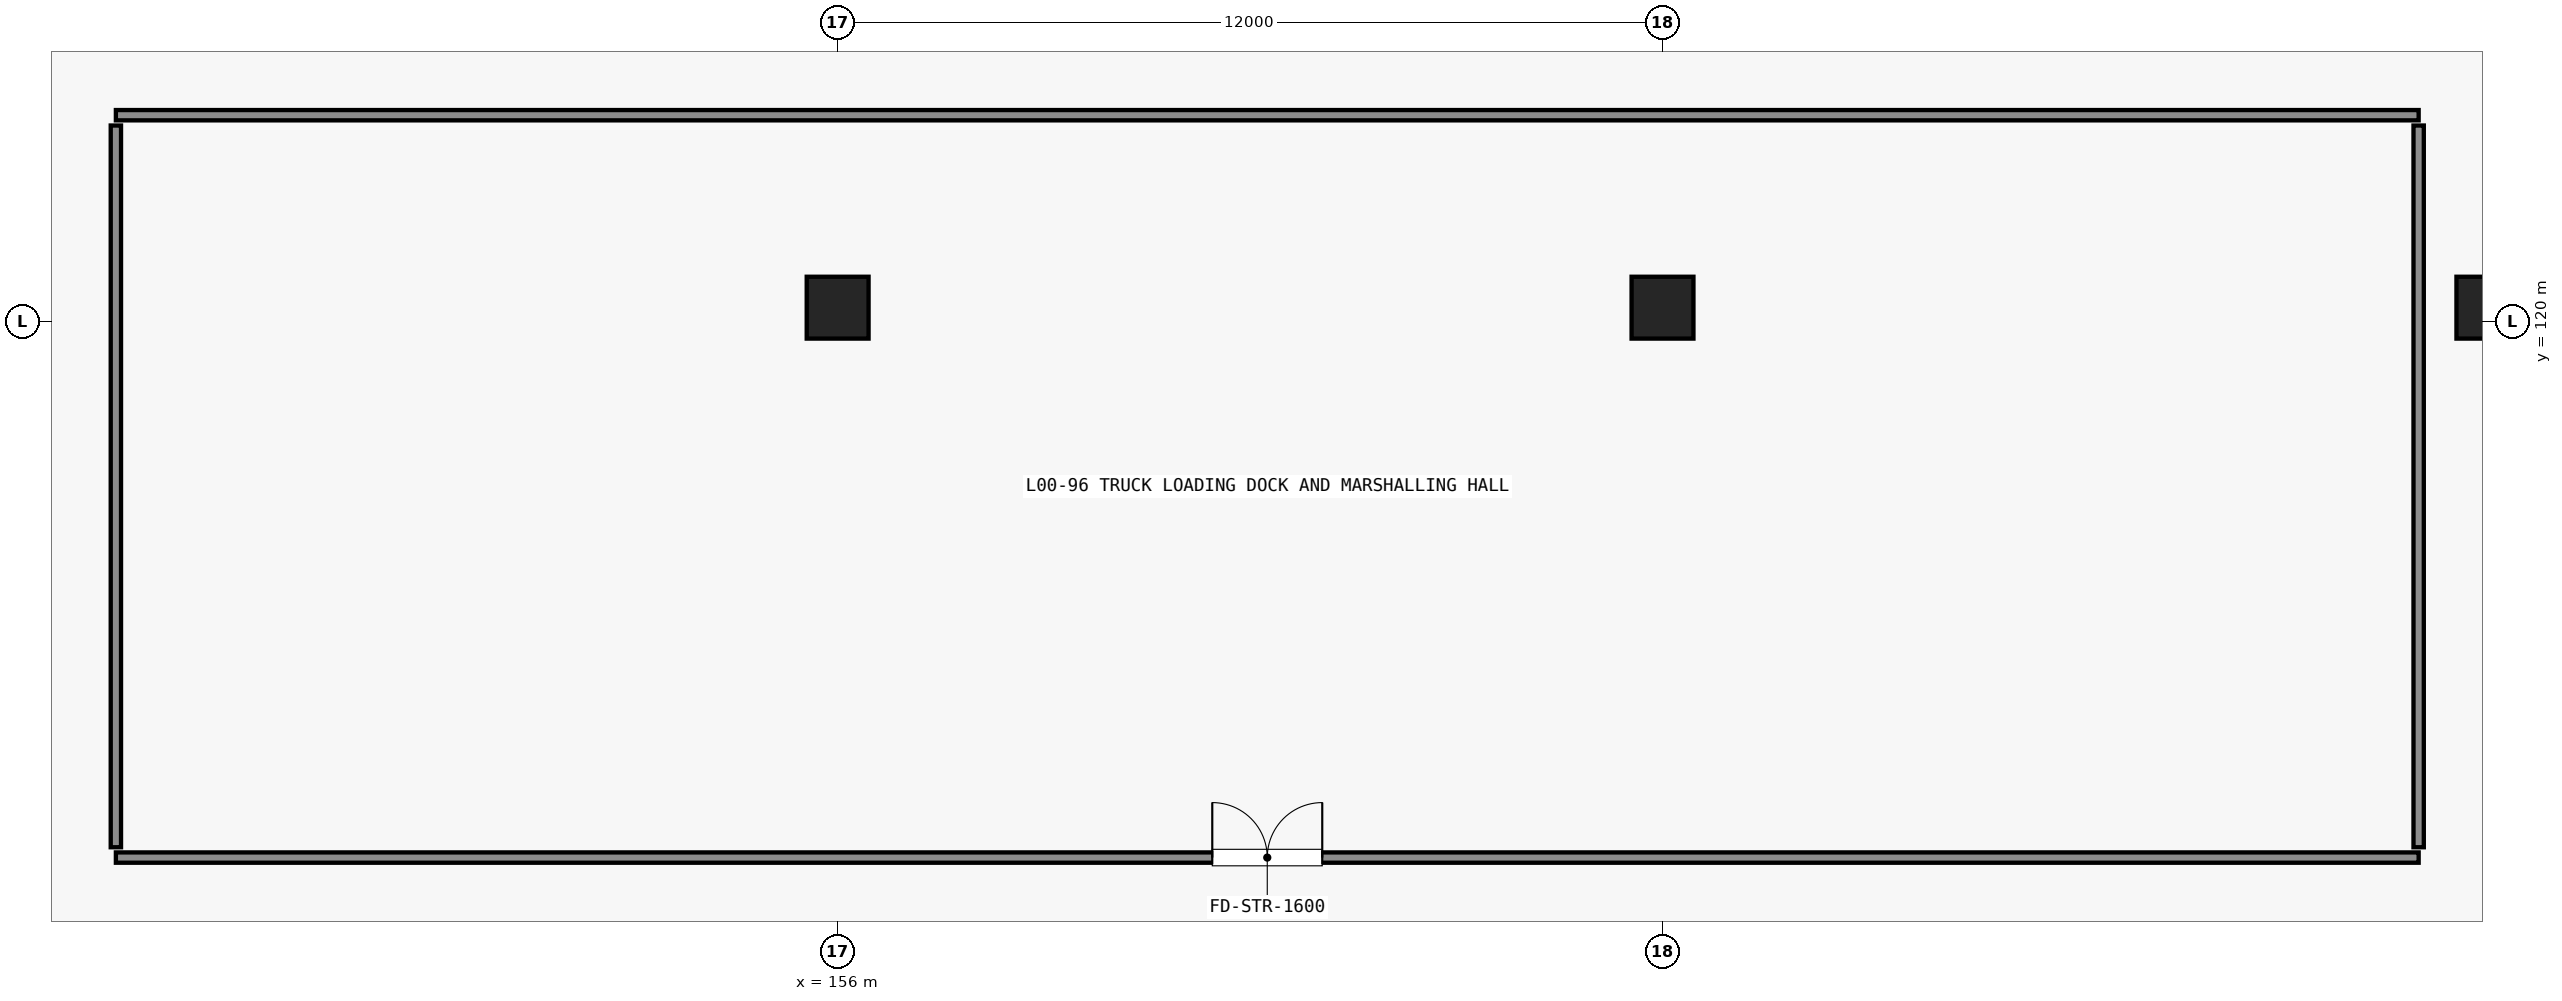
"""IFC4 building model, lengths in metres.
Left out: names, types, materials, properties, quantities, classifications, styles, units other than length and angle.
Written with IfcOpenShell. Run it as: python <this file> out.ifc"""

import sys

from ifc_helpers import new_model, si_unit, direction, frame, frame_2d, origin, origin_2d, place, context, subcontext, project, spatial, rectangle, extrude, element, fill, save


model = new_model("IFC4")
c1 = context("Model", 3, precision=1e-05, world=origin(), true_north=direction((0.0, 1.0)))
c2 = subcontext(c1, "Body", "Model", "MODEL_VIEW")
j1 = project(units=[si_unit("LENGTHUNIT", "METRE"), si_unit("PLANEANGLEUNIT", "RADIAN")], contexts=[c1])
p1 = place(None, origin())
s1 = spatial("IfcSite", under=j1, at=p1, CompositionType="ELEMENT")
p2 = place(p1, origin())
s2 = spatial("IfcBuilding", under=s1, at=p2, CompositionType="ELEMENT")
p3 = place(p2, origin())
s3 = spatial("IfcBuildingStorey", under=s2, at=p3, CompositionType="ELEMENT", Elevation=0.0)
for number, where, z_axis, x_axis in (
    (1, (156.0, 120.2, 0.0), (0.0, 0.0, 1.0), (1.0, 0.0, 0.0)),
    (2, (168.0, 120.2, 0.0), (0.0, 0.0, 1.0), (1.0, 0.0, 0.0)),
    (3, (180.0, 120.2, 0.0), (0.0, 0.0, 1.0), (1.0, 0.0, 0.0)),
):
    element("IfcColumn", number, at=place(p3, frame(where, z_axis=z_axis, x_axis=x_axis)), inside=s3, PredefinedType="COLUMN", context=c2, shape_type="SweptSolid", body=[
        extrude(rectangle(XDim=0.9, YDim=0.9, at=origin_2d()), origin(), (0.0, 0.0, 1.0), 6.0),
    ])
p4 = place(p3, frame((145.5, 112.2, 0.0), z_axis=(0.0, 0.0, 1.0), x_axis=(1.0, 0.0, 0.0)))
e4 = element("IfcWall", 4, at=p4, inside=s3, PredefinedType="STANDARD", context=c2, shape_type="SweptSolid", body=[
    extrude(rectangle(XDim=33.5, YDim=0.15, at=frame_2d((16.75, 0.0))), origin(), (0.0, 0.0, 1.0), 5.028),
])
p5 = place(p4, frame((15.95, 0.0, 0.0)))
e5 = element("IfcOpeningElement", 5, at=p5, cuts=e4, PredefinedType="OPENING", context=c2, shape_type="SweptSolid", body=[
    extrude(rectangle(XDim=1.6, YDim=2.25, at=frame_2d((0.8, 1.125))), frame((0.0, 0.085, 0.0), z_axis=(0.0, -1.0, 0.0), x_axis=(1.0, 0.0, 0.0)), (0.0, 0.0, 1.0), 0.17),
])
p6 = place(p3, frame((145.5, 123.0, 0.0), z_axis=(0.0, 0.0, 1.0), x_axis=(1.0, 0.0, 0.0)))
e6 = element("IfcWall", 6, at=p6, inside=s3, PredefinedType="STANDARD", context=c2, shape_type="SweptSolid", body=[
    extrude(rectangle(XDim=33.5, YDim=0.15, at=frame_2d((16.75, 0.0))), origin(), (0.0, 0.0, 1.0), 5.028),
])
for number, where, z_axis, x_axis in (
    (7, (145.5, 112.35, 0.0), (0.0, 0.0, 1.0), (0.0, 1.0, 0.0)),
    (8, (179.0, 112.35, 0.0), (0.0, 0.0, 1.0), (0.0, 1.0, 0.0)),
):
    element("IfcWall", number, at=place(p3, frame(where, z_axis=z_axis, x_axis=x_axis)), inside=s3, PredefinedType="STANDARD", context=c2, shape_type="SweptSolid", body=[
        extrude(rectangle(XDim=10.5, YDim=0.15, at=frame_2d((5.25, 0.0))), origin(), (0.0, 0.0, 1.0), 5.028),
    ])
p7 = place(p5, origin())
e9 = element("IfcDoor", 9, at=p7, inside=s3, OperationType="DOUBLE_DOOR_SINGLE_SWING", PredefinedType="DOOR", context=c2, shape_type="SweptSolid", body=[
    extrude(rectangle(XDim=1.6, YDim=2.25, at=frame_2d((0.8, 1.125))), frame((0.0, 0.025, 0.0), z_axis=(0.0, -1.0, 0.0), x_axis=(1.0, 0.0, 0.0)), (0.0, 0.0, 1.0), 0.05),
])
fill(e5, e9)
save(model, sys.argv[1])
